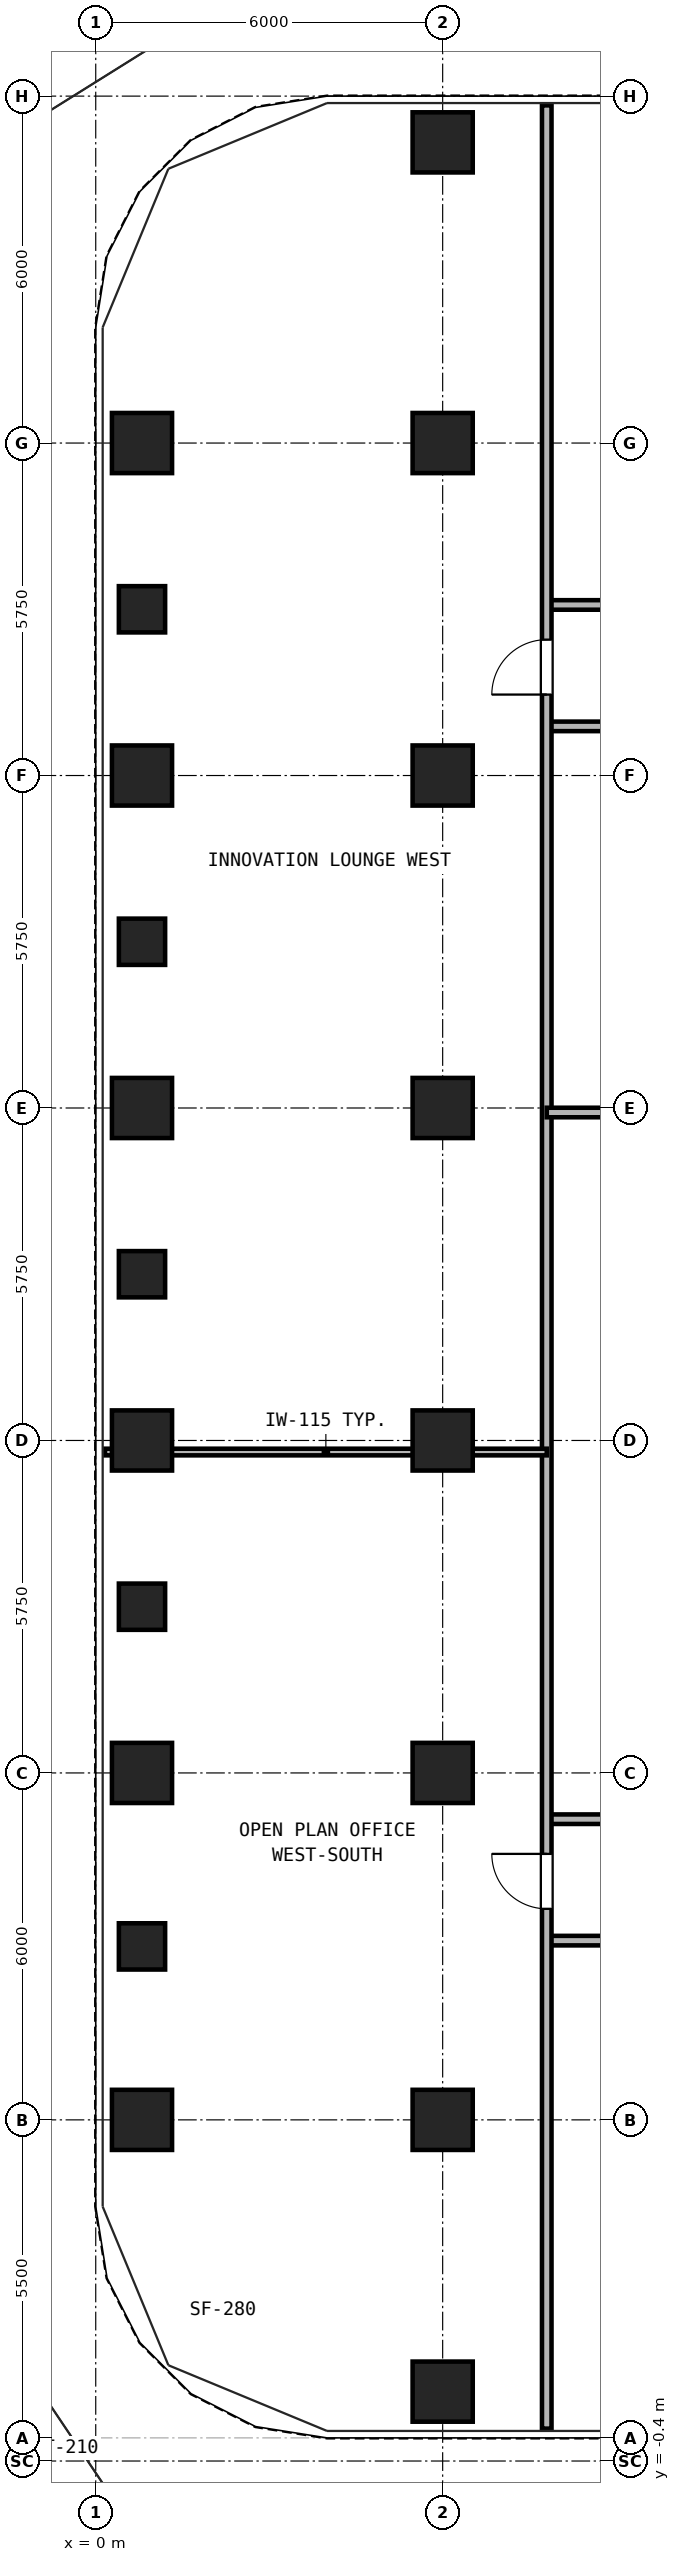
"""IFC4 building model, lengths in metres.
Left out: names, types, materials, properties, quantities, classifications, styles, units other than length and angle.
Written with IfcOpenShell. Run it as: python <this file> out.ifc"""

import sys

from ifc_helpers import new_model, si_unit, direction, frame, frame_2d, origin, origin_2d, place, context, subcontext, project, spatial, rectangle, hollow_rectangle, extrude, source, transform, mapped, element, fill, save


model = new_model("IFC4")
c1 = context("Model", 3, precision=1e-05, world=origin(), true_north=direction((0.0, 1.0)))
c2 = subcontext(c1, "Body", "Model", "MODEL_VIEW")
j1 = project(units=[si_unit("LENGTHUNIT", "METRE"), si_unit("PLANEANGLEUNIT", "RADIAN")], contexts=[c1])
p1 = place(None, origin())
s1 = spatial("IfcSite", under=j1, at=p1, CompositionType="ELEMENT")
p2 = place(p1, origin())
s2 = spatial("IfcBuilding", under=s1, at=p2, CompositionType="ELEMENT")
p3 = place(p2, frame((0.0, 0.0, 69.3)))
s3 = spatial("IfcBuildingStorey", under=s2, at=p3, CompositionType="ELEMENT", Elevation=69.3)
m1 = source(origin(), c2, "Body", "SweptSolid", [
    extrude(hollow_rectangle(XDim=1.04, YDim=1.04, WallThickness=0.065, at=origin_2d()), origin(), (0.0, 0.0, 1.0), 3.32),
])
for number, where, z_axis, x_axis in (
    (1, (6.0, 0.8, 0.0), (0.0, 0.0, 1.0), (1.0, 0.0, 0.0)),
    (2, (6.0, 39.7, 0.0), (0.0, 0.0, 1.0), (1.0, 0.0, 0.0)),
    (3, (0.8, 5.5, 0.0), (0.0, 0.0, 1.0), (1.0, 0.0, 0.0)),
    (4, (0.8, 11.5, 0.0), (0.0, 0.0, 1.0), (1.0, 0.0, 0.0)),
    (5, (0.8, 17.25, 0.0), (0.0, 0.0, 1.0), (1.0, 0.0, 0.0)),
    (6, (0.8, 23.0, 0.0), (0.0, 0.0, 1.0), (1.0, 0.0, 0.0)),
    (7, (0.8, 28.75, 0.0), (0.0, 0.0, 1.0), (1.0, 0.0, 0.0)),
    (8, (0.8, 34.5, 0.0), (0.0, 0.0, 1.0), (1.0, 0.0, 0.0)),
    (9, (6.0, 5.5, 0.0), (0.0, 0.0, 1.0), (1.0, 0.0, 0.0)),
    (10, (6.0, 11.5, 0.0), (0.0, 0.0, 1.0), (1.0, 0.0, 0.0)),
    (11, (6.0, 17.25, 0.0), (0.0, 0.0, 1.0), (1.0, 0.0, 0.0)),
    (12, (6.0, 23.0, 0.0), (0.0, 0.0, 1.0), (1.0, 0.0, 0.0)),
    (13, (6.0, 28.75, 0.0), (0.0, 0.0, 1.0), (1.0, 0.0, 0.0)),
    (14, (6.0, 34.5, 0.0), (0.0, 0.0, 1.0), (1.0, 0.0, 0.0)),
):
    element("IfcColumn", number, at=place(p3, frame(where, z_axis=z_axis, x_axis=x_axis)), inside=s3, PredefinedType="COLUMN", context=c2, shape_type="MappedRepresentation", body=[
        mapped(m1, transform((0.0, 0.0, 0.0), x_axis=(1.0, 0.0, 0.0), y_axis=(0.0, 1.0, 0.0), z_axis=(0.0, 0.0, 1.0), scale=1.0)),
    ])
m2 = source(origin(), c2, "Body", "SweptSolid", [
    extrude(hollow_rectangle(XDim=0.8, YDim=0.8, WallThickness=0.045, at=origin_2d()), origin(), (0.0, 0.0, 1.0), 3.32),
])
for number, where, z_axis, x_axis in (
    (15, (0.8, 8.5, 0.0), (0.0, 0.0, 1.0), (1.0, 0.0, 0.0)),
    (16, (0.8, 14.375, 0.0), (0.0, 0.0, 1.0), (1.0, 0.0, 0.0)),
    (17, (0.8, 20.125, 0.0), (0.0, 0.0, 1.0), (1.0, 0.0, 0.0)),
    (18, (0.8, 25.875, 0.0), (0.0, 0.0, 1.0), (1.0, 0.0, 0.0)),
    (19, (0.8, 31.625, 0.0), (0.0, 0.0, 1.0), (1.0, 0.0, 0.0)),
):
    element("IfcColumn", number, at=place(p3, frame(where, z_axis=z_axis, x_axis=x_axis)), inside=s3, PredefinedType="COLUMN", context=c2, shape_type="MappedRepresentation", body=[
        mapped(m2, transform((0.0, 0.0, 0.0), x_axis=(1.0, 0.0, 0.0), y_axis=(0.0, 1.0, 0.0), z_axis=(0.0, 0.0, 1.0), scale=1.0)),
    ])
p4 = place(p3, frame((7.8, 8.6, 0.0), z_axis=(0.0, 0.0, 1.0), x_axis=(1.0, 0.0, 0.0)))
e20 = element("IfcWall", 20, at=p4, inside=s3, PredefinedType="PARTITIONING", context=c2, shape_type="SweptSolid", body=[
    extrude(rectangle(XDim=31.4, YDim=0.165, at=frame_2d((15.7, 0.0))), origin(), (0.0, 0.0, 1.0), 2.898),
])
p5 = place(p4, frame((2.6, 0.0, 0.0)))
e21 = element("IfcOpeningElement", 21, at=p5, cuts=e20, PredefinedType="OPENING", context=c2, shape_type="SweptSolid", body=[
    extrude(rectangle(XDim=0.95, YDim=2.15, at=frame_2d((0.475, 1.075))), frame((0.0, 0.093, 0.0), z_axis=(0.0, -1.0, 0.0), x_axis=(1.0, 0.0, 0.0)), (0.0, 0.0, 1.0), 0.185),
])
p6 = place(p4, frame((8.8, 0.0, 0.0)))
e22 = element("IfcOpeningElement", 22, at=p6, cuts=e20, PredefinedType="OPENING", context=c2, shape_type="SweptSolid", body=[
    extrude(rectangle(XDim=0.95, YDim=2.15, at=frame_2d((0.475, 1.075))), frame((0.0, 0.093, 0.0), z_axis=(0.0, -1.0, 0.0), x_axis=(1.0, 0.0, 0.0)), (0.0, 0.0, 1.0), 0.185),
])
p7 = place(p4, frame((15.0, 0.0, 0.0)))
e23 = element("IfcOpeningElement", 23, at=p7, cuts=e20, PredefinedType="OPENING", context=c2, shape_type="SweptSolid", body=[
    extrude(rectangle(XDim=0.95, YDim=2.15, at=frame_2d((0.475, 1.075))), frame((0.0, 0.093, 0.0), z_axis=(0.0, -1.0, 0.0), x_axis=(1.0, 0.0, 0.0)), (0.0, 0.0, 1.0), 0.185),
])
p8 = place(p4, frame((21.2, 0.0, 0.0)))
e24 = element("IfcOpeningElement", 24, at=p8, cuts=e20, PredefinedType="OPENING", context=c2, shape_type="SweptSolid", body=[
    extrude(rectangle(XDim=0.95, YDim=2.15, at=frame_2d((0.475, 1.075))), frame((0.0, 0.093, 0.0), z_axis=(0.0, -1.0, 0.0), x_axis=(1.0, 0.0, 0.0)), (0.0, 0.0, 1.0), 0.185),
])
p9 = place(p4, frame((26.2, 0.0, 0.0)))
e25 = element("IfcOpeningElement", 25, at=p9, cuts=e20, PredefinedType="OPENING", context=c2, shape_type="SweptSolid", body=[
    extrude(rectangle(XDim=0.95, YDim=2.15, at=frame_2d((0.475, 1.075))), frame((0.0, 0.093, 0.0), z_axis=(0.0, -1.0, 0.0), x_axis=(1.0, 0.0, 0.0)), (0.0, 0.0, 1.0), 0.185),
])
p10 = place(p4, frame((29.5, 0.0, 0.0)))
e26 = element("IfcOpeningElement", 26, at=p10, cuts=e20, PredefinedType="OPENING", context=c2, shape_type="SweptSolid", body=[
    extrude(rectangle(XDim=0.92, YDim=2.1, at=frame_2d((0.46, 1.05))), frame((0.0, 0.093, 0.0), z_axis=(0.0, -1.0, 0.0), x_axis=(1.0, 0.0, 0.0)), (0.0, 0.0, 1.0), 0.185),
])
p11 = place(p3, frame((7.8, 31.7, 0.0), z_axis=(0.0, 0.0, 1.0), x_axis=(1.0, 0.0, 0.0)))
e27 = element("IfcWall", 27, at=p11, inside=s3, PredefinedType="PARTITIONING", context=c2, shape_type="SweptSolid", body=[
    extrude(rectangle(XDim=31.4, YDim=0.165, at=frame_2d((15.7, 0.0))), origin(), (0.0, 0.0, 1.0), 2.898),
])
p12 = place(p11, frame((3.85, 0.0, 0.0)))
e28 = element("IfcOpeningElement", 28, at=p12, cuts=e27, PredefinedType="OPENING", context=c2, shape_type="SweptSolid", body=[
    extrude(rectangle(XDim=0.95, YDim=2.15, at=frame_2d((0.475, 1.075))), frame((0.0, 0.093, 0.0), z_axis=(0.0, -1.0, 0.0), x_axis=(1.0, 0.0, 0.0)), (0.0, 0.0, 1.0), 0.185),
])
p13 = place(p11, frame((12.2, 0.0, 0.0)))
e29 = element("IfcOpeningElement", 29, at=p13, cuts=e27, PredefinedType="OPENING", context=c2, shape_type="SweptSolid", body=[
    extrude(rectangle(XDim=0.95, YDim=2.15, at=frame_2d((0.475, 1.075))), frame((0.0, 0.093, 0.0), z_axis=(0.0, -1.0, 0.0), x_axis=(1.0, 0.0, 0.0)), (0.0, 0.0, 1.0), 0.185),
])
p14 = place(p11, frame((20.2, 0.0, 0.0)))
e30 = element("IfcOpeningElement", 30, at=p14, cuts=e27, PredefinedType="OPENING", context=c2, shape_type="SweptSolid", body=[
    extrude(rectangle(XDim=0.95, YDim=2.15, at=frame_2d((0.475, 1.075))), frame((0.0, 0.093, 0.0), z_axis=(0.0, -1.0, 0.0), x_axis=(1.0, 0.0, 0.0)), (0.0, 0.0, 1.0), 0.185),
])
p15 = place(p11, frame((27.55, 0.0, 0.0)))
e31 = element("IfcOpeningElement", 31, at=p15, cuts=e27, PredefinedType="OPENING", context=c2, shape_type="SweptSolid", body=[
    extrude(rectangle(XDim=0.92, YDim=2.1, at=frame_2d((0.46, 1.05))), frame((0.0, 0.093, 0.0), z_axis=(0.0, -1.0, 0.0), x_axis=(1.0, 0.0, 0.0)), (0.0, 0.0, 1.0), 0.185),
])
for number, where, z_axis, x_axis in (
    (32, (7.8, 10.7, 0.0), (0.0, 0.0, 1.0), (1.0, 0.0, 0.0)),
    (33, (7.8, 29.6, 0.0), (0.0, 0.0, 1.0), (1.0, 0.0, 0.0)),
):
    element("IfcWall", number, at=place(p3, frame(where, z_axis=z_axis, x_axis=x_axis)), inside=s3, PredefinedType="PARTITIONING", context=c2, shape_type="SweptSolid", body=[
        extrude(rectangle(XDim=8.5, YDim=0.165, at=frame_2d((4.25, 0.0))), origin(), (0.0, 0.0, 1.0), 3.32),
    ])
p16 = place(p3, frame((7.8, 0.16, 0.0), z_axis=(0.0, 0.0, 1.0), x_axis=(0.0, 1.0, 0.0)))
e34 = element("IfcWall", 34, at=p16, inside=s3, PredefinedType="PARTITIONING", context=c2, shape_type="SweptSolid", body=[
    extrude(rectangle(XDim=40.18, YDim=0.165, at=frame_2d((20.09, 0.0))), origin(), (0.0, 0.0, 1.0), 3.32),
])
p17 = place(p16, frame((8.99, 0.0, 0.0)))
e35 = element("IfcOpeningElement", 35, at=p17, cuts=e34, PredefinedType="OPENING", context=c2, shape_type="SweptSolid", body=[
    extrude(rectangle(XDim=0.95, YDim=2.15, at=frame_2d((0.475, 1.075))), frame((0.0, 0.093, 0.0), z_axis=(0.0, -1.0, 0.0), x_axis=(1.0, 0.0, 0.0)), (0.0, 0.0, 1.0), 0.185),
])
p18 = place(p16, frame((29.99, 0.0, 0.0)))
e36 = element("IfcOpeningElement", 36, at=p18, cuts=e34, PredefinedType="OPENING", context=c2, shape_type="SweptSolid", body=[
    extrude(rectangle(XDim=0.95, YDim=2.15, at=frame_2d((0.475, 1.075))), frame((0.0, 0.093, 0.0), z_axis=(0.0, -1.0, 0.0), x_axis=(1.0, 0.0, 0.0)), (0.0, 0.0, 1.0), 0.185),
])
p19 = place(p3, frame((0.16, 17.05, 0.0), z_axis=(0.0, 0.0, 1.0), x_axis=(1.0, 0.0, 0.0)))
e37 = element("IfcWall", 37, at=p19, inside=s3, PredefinedType="PARTITIONING", context=c2, shape_type="SweptSolid", body=[
    extrude(rectangle(XDim=7.64, YDim=0.115, at=frame_2d((3.82, 0.0))), origin(), (0.0, 0.0, 1.0), 2.539),
])
p20 = place(p3, frame((7.8, 22.922, 0.0), z_axis=(0.0, 0.0, 1.0), x_axis=(1.0, 0.0, 0.0)))
e38 = element("IfcWall", 38, at=p20, inside=s3, PredefinedType="PARTITIONING", context=c2, shape_type="SweptSolid", body=[
    extrude(rectangle(XDim=8.5, YDim=0.165, at=frame_2d((4.25, 0.0))), origin(), (0.0, 0.0, 1.0), 2.539),
])
p21 = place(p17, frame((0.95, 0.0, 0.0), z_axis=(0.0, 0.0, 1.0), x_axis=(-1.0, 0.0, 0.0)))
e39 = element("IfcDoor", 39, at=p21, inside=s3, OperationType="SINGLE_SWING_RIGHT", PredefinedType="DOOR", context=c2, shape_type="SweptSolid", body=[
    extrude(rectangle(XDim=0.95, YDim=2.15, at=frame_2d((0.475, 1.075))), frame((0.0, 0.025, 0.0), z_axis=(0.0, -1.0, 0.0), x_axis=(1.0, 0.0, 0.0)), (0.0, 0.0, 1.0), 0.05),
])
fill(e35, e39)
p22 = place(p18, frame((0.95, 0.0, 0.0), z_axis=(0.0, 0.0, 1.0), x_axis=(-1.0, 0.0, 0.0)))
e40 = element("IfcDoor", 40, at=p22, inside=s3, OperationType="SINGLE_SWING_LEFT", PredefinedType="DOOR", context=c2, shape_type="SweptSolid", body=[
    extrude(rectangle(XDim=0.95, YDim=2.15, at=frame_2d((0.475, 1.075))), frame((0.0, 0.025, 0.0), z_axis=(0.0, -1.0, 0.0), x_axis=(1.0, 0.0, 0.0)), (0.0, 0.0, 1.0), 0.05),
])
fill(e36, e40)
save(model, sys.argv[1])
